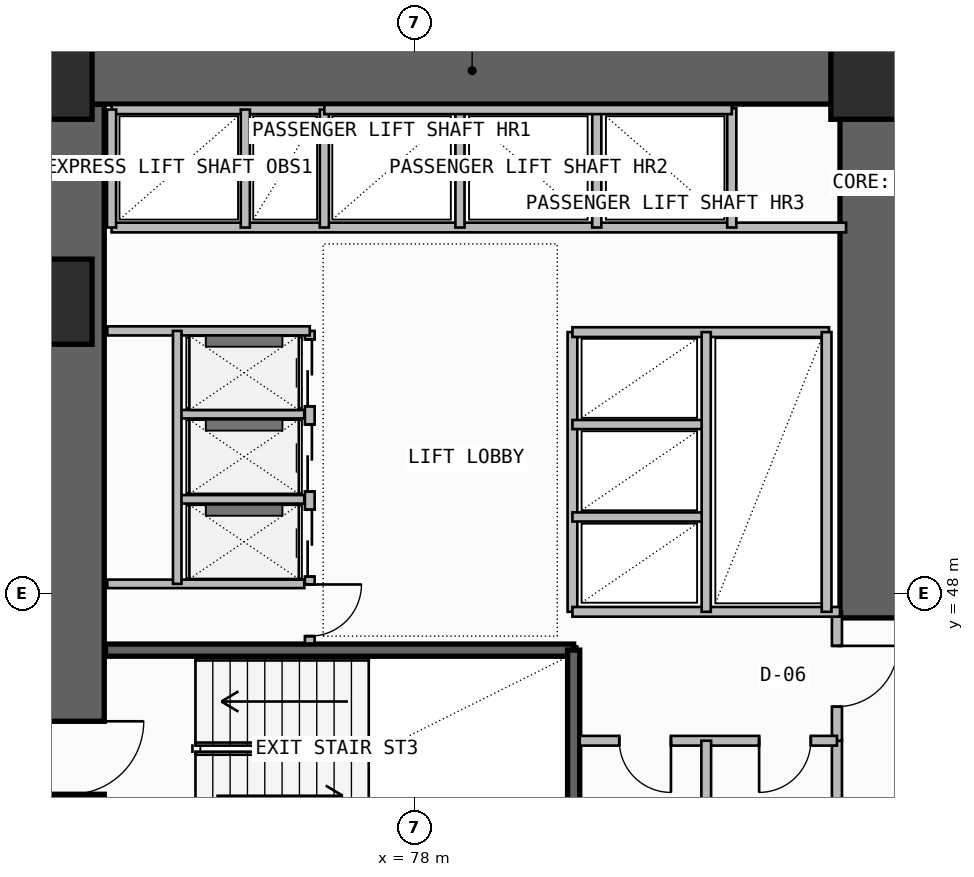
"""IFC4 building model, lengths in metres.
Left out: names, types, materials, properties, quantities, classifications, styles, units other than length and angle.
Written with IfcOpenShell. Run it as: python <this file> out.ifc"""

import sys

from ifc_helpers import new_model, si_unit, direction, frame, frame_2d, origin, origin_2d, place, context, subcontext, project, spatial, rectangle, extrude, element, fill, save


model = new_model("IFC4")
c1 = context("Model", 3, precision=1e-05, world=origin(), true_north=direction((0.0, 1.0)))
c2 = subcontext(c1, "Body", "Model", "MODEL_VIEW")
j1 = project(units=[si_unit("LENGTHUNIT", "METRE"), si_unit("PLANEANGLEUNIT", "RADIAN")], contexts=[c1])
p1 = place(None, origin())
s1 = spatial("IfcSite", under=j1, at=p1, CompositionType="ELEMENT")
p2 = place(p1, origin())
s2 = spatial("IfcBuilding", under=s1, at=p2, CompositionType="ELEMENT")
p3 = place(p2, frame((0.0, 0.0, 44.7)))
s3 = spatial("IfcBuildingStorey", under=s2, at=p3, CompositionType="ELEMENT", Elevation=44.7)
p4 = place(p3, frame((72.35, 43.35, -0.2), z_axis=(0.0, 0.0, 1.0), x_axis=(0.0, 1.0, 0.0)))
e1 = element("IfcWall", 1, at=p4, inside=s3, PredefinedType="SHEAR", context=c2, shape_type="SweptSolid", body=[
    extrude(rectangle(XDim=12.7, YDim=1.1, at=frame_2d((6.35, 0.0))), origin(), (0.0, 0.0, 1.0), 3.54),
])
p5 = place(p4, frame((1.35, 0.0, 0.2)))
e2 = element("IfcOpeningElement", 2, at=p5, cuts=e1, PredefinedType="OPENING", context=c2, shape_type="SweptSolid", body=[
    extrude(rectangle(XDim=1.2, YDim=2.2, at=frame_2d((0.6, 1.1))), frame((0.0, 0.56, 0.0), z_axis=(0.0, -1.0, 0.0), x_axis=(1.0, 0.0, 0.0)), (0.0, 0.0, 1.0), 1.12),
])
p6 = place(p3, frame((71.8, 56.6, -0.2), z_axis=(0.0, 0.0, 1.0), x_axis=(1.0, 0.0, 0.0)))
e3 = element("IfcWall", 3, at=p6, inside=s3, PredefinedType="SHEAR", context=c2, shape_type="SweptSolid", body=[
    extrude(rectangle(XDim=14.3, YDim=1.1, at=frame_2d((7.15, 0.0))), origin(), (0.0, 0.0, 1.0), 3.54),
])
p7 = place(p3, frame((85.55, 47.6, -0.2), z_axis=(0.0, 0.0, 1.0), x_axis=(0.0, 1.0, 0.0)))
e4 = element("IfcWall", 4, at=p7, inside=s3, PredefinedType="SHEAR", context=c2, shape_type="SweptSolid", body=[
    extrude(rectangle(XDim=8.45, YDim=1.1, at=frame_2d((4.225, 0.0))), origin(), (0.0, 0.0, 1.0), 3.54),
])
for number, where, z_axis, x_axis in (
    (5, (72.0, 52.8, 0.0), (0.0, 0.0, 1.0), (1.0, 0.0, 0.0)),
    (6, (72.0, 56.5, 0.0), (0.0, 0.0, 1.0), (1.0, 0.0, 0.0)),
    (7, (85.55, 56.5, 0.0), (0.0, 0.0, 1.0), (1.0, 0.0, 0.0)),
):
    element("IfcColumn", number, at=place(p3, frame(where, z_axis=z_axis, x_axis=x_axis)), inside=s3, PredefinedType="COLUMN", context=c2, shape_type="SweptSolid", body=[
        extrude(rectangle(XDim=1.4, YDim=1.4, at=origin_2d()), origin(), (0.0, 0.0, 1.0), 3.6),
    ])
p8 = place(p3, frame((72.92, 47.07, -0.2), z_axis=(0.0, 0.0, 1.0), x_axis=(1.0, 0.0, 0.0)))
e8 = element("IfcWall", 8, at=p8, inside=s3, PredefinedType="SOLIDWALL", context=c2, shape_type="SweptSolid", body=[
    extrude(rectangle(XDim=7.7, YDim=0.2, at=frame_2d((3.85, 0.0))), origin(), (0.0, 0.0, 1.0), 3.54),
])
p9 = place(p3, frame((80.62, 43.83, -0.2), z_axis=(0.0, 0.0, 1.0), x_axis=(0.0, 1.0, 0.0)))
e9 = element("IfcWall", 9, at=p9, inside=s3, PredefinedType="SOLIDWALL", context=c2, shape_type="SweptSolid", body=[
    extrude(rectangle(XDim=3.24, YDim=0.2, at=frame_2d((1.62, 0.0))), origin(), (0.0, 0.0, 1.0), 3.54),
])
p10 = place(p3, frame((84.95, 43.68, 0.0), z_axis=(0.0, 0.0, 1.0), x_axis=(0.0, 1.0, 0.0)))
e10 = element("IfcWall", 10, at=p10, inside=s3, PredefinedType="PLUMBINGWALL", context=c2, shape_type="SweptSolid", body=[
    extrude(rectangle(XDim=1.9, YDim=0.165, at=frame_2d((0.95, 0.0))), origin(), (0.0, 0.0, 1.0), 3.34),
])
p11 = place(p3, frame((84.95, 45.58, 0.0), z_axis=(0.0, 0.0, 1.0), x_axis=(0.0, 1.0, 0.0)))
e11 = element("IfcWall", 11, at=p11, inside=s3, PredefinedType="PARTITIONING", context=c2, shape_type="SweptSolid", body=[
    extrude(rectangle(XDim=2.12, YDim=0.165, at=frame_2d((1.06, 0.0))), origin(), (0.0, 0.0, 1.0), 3.34),
])
p12 = place(p11, frame((0.56, 0.0, 0.0)))
e12 = element("IfcOpeningElement", 12, at=p12, cuts=e11, PredefinedType="OPENING", context=c2, shape_type="SweptSolid", body=[
    extrude(rectangle(XDim=1.0, YDim=2.2, at=frame_2d((0.5, 1.1))), frame((0.0, 0.093, 0.0), z_axis=(0.0, -1.0, 0.0), x_axis=(1.0, 0.0, 0.0)), (0.0, 0.0, 1.0), 0.185),
])
p13 = place(p3, frame((80.72, 45.58, 0.0), z_axis=(0.0, 0.0, 1.0), x_axis=(1.0, 0.0, 0.0)))
e13 = element("IfcWall", 13, at=p13, inside=s3, PredefinedType="PLUMBINGWALL", context=c2, shape_type="SweptSolid", body=[
    extrude(rectangle(XDim=4.23, YDim=0.16, at=frame_2d((2.115, 0.0))), origin(), (0.0, 0.0, 1.0), 3.34),
])
p14 = place(p13, frame((0.65, 0.0, 0.0)))
e14 = element("IfcOpeningElement", 14, at=p14, cuts=e13, PredefinedType="OPENING", context=c2, shape_type="SweptSolid", body=[
    extrude(rectangle(XDim=0.85, YDim=2.05, at=frame_2d((0.425, 1.025))), frame((0.0, 0.09, 0.0), z_axis=(0.0, -1.0, 0.0), x_axis=(1.0, 0.0, 0.0)), (0.0, 0.0, 1.0), 0.18),
])
p15 = place(p13, frame((2.95, 0.0, 0.0)))
e15 = element("IfcOpeningElement", 15, at=p15, cuts=e13, PredefinedType="OPENING", context=c2, shape_type="SweptSolid", body=[
    extrude(rectangle(XDim=0.85, YDim=2.05, at=frame_2d((0.425, 1.025))), frame((0.0, 0.09, 0.0), z_axis=(0.0, -1.0, 0.0), x_axis=(1.0, 0.0, 0.0)), (0.0, 0.0, 1.0), 0.18),
])
p16 = place(p3, frame((82.8, 43.68, 0.0), z_axis=(0.0, 0.0, 1.0), x_axis=(0.0, 1.0, 0.0)))
e16 = element("IfcWall", 16, at=p16, inside=s3, PredefinedType="PLUMBINGWALL", context=c2, shape_type="SweptSolid", body=[
    extrude(rectangle(XDim=1.9, YDim=0.16, at=frame_2d((0.95, 0.0))), origin(), (0.0, 0.0, 1.0), 3.34),
])
p17 = place(p3, frame((76.28, 47.18, 0.0), z_axis=(0.0, 0.0, 1.0), x_axis=(0.0, 1.0, 0.0)))
e17 = element("IfcWall", 17, at=p17, inside=s3, PredefinedType="SOLIDWALL", context=c2, shape_type="SweptSolid", body=[
    extrude(rectangle(XDim=5.14, YDim=0.16, at=frame_2d((2.57, 0.0))), origin(), (0.0, 0.0, 1.0), 3.34),
])
p18 = place(p17, frame((1.1, 0.0, 0.0)))
e18 = element("IfcOpeningElement", 18, at=p18, cuts=e17, PredefinedType="OPENING", context=c2, shape_type="SweptSolid", body=[
    extrude(rectangle(XDim=1.1, YDim=2.25, at=frame_2d((0.55, 1.125))), frame((0.0, 0.09, 0.0), z_axis=(0.0, -1.0, 0.0), x_axis=(1.0, 0.0, 0.0)), (0.0, 0.0, 1.0), 0.18),
])
p19 = place(p17, frame((2.5, 0.0, 0.0)))
e19 = element("IfcOpeningElement", 19, at=p19, cuts=e17, PredefinedType="OPENING", context=c2, shape_type="SweptSolid", body=[
    extrude(rectangle(XDim=1.1, YDim=2.25, at=frame_2d((0.55, 1.125))), frame((0.0, 0.09, 0.0), z_axis=(0.0, -1.0, 0.0), x_axis=(1.0, 0.0, 0.0)), (0.0, 0.0, 1.0), 0.18),
])
p20 = place(p17, frame((3.9, 0.0, 0.0)))
e20 = element("IfcOpeningElement", 20, at=p20, cuts=e17, PredefinedType="OPENING", context=c2, shape_type="SweptSolid", body=[
    extrude(rectangle(XDim=1.1, YDim=2.25, at=frame_2d((0.55, 1.125))), frame((0.0, 0.09, 0.0), z_axis=(0.0, -1.0, 0.0), x_axis=(1.0, 0.0, 0.0)), (0.0, 0.0, 1.0), 0.18),
])
p21 = place(p17, frame((0.12, 0.0, 0.0)))
e21 = element("IfcOpeningElement", 21, at=p21, cuts=e17, PredefinedType="OPENING", context=c2, shape_type="SweptSolid", body=[
    extrude(rectangle(XDim=0.85, YDim=2.05, at=frame_2d((0.425, 1.025))), frame((0.0, 0.09, 0.0), z_axis=(0.0, -1.0, 0.0), x_axis=(1.0, 0.0, 0.0)), (0.0, 0.0, 1.0), 0.18),
])
p22 = place(p3, frame((72.95, 52.32, 0.0), z_axis=(0.0, 0.0, 1.0), x_axis=(1.0, 0.0, 0.0)))
e22 = element("IfcWall", 22, at=p22, inside=s3, PredefinedType="SOLIDWALL", context=c2, shape_type="SweptSolid", body=[
    extrude(rectangle(XDim=3.33, YDim=0.15, at=frame_2d((1.665, 0.0))), origin(), (0.0, 0.0, 1.0), 3.34),
])
p23 = place(p3, frame((72.95, 48.16, 0.0), z_axis=(0.0, 0.0, 1.0), x_axis=(1.0, 0.0, 0.0)))
e23 = element("IfcWall", 23, at=p23, inside=s3, PredefinedType="PLUMBINGWALL", context=c2, shape_type="SweptSolid", body=[
    extrude(rectangle(XDim=3.24, YDim=0.14, at=frame_2d((1.62, 0.0))), origin(), (0.0, 0.0, 1.0), 3.34),
])
for number, where, z_axis, x_axis in (
    (24, (74.15, 49.55, 0.0), (0.0, 0.0, 1.0), (1.0, 0.0, 0.0)),
    (25, (74.15, 50.95, 0.0), (0.0, 0.0, 1.0), (1.0, 0.0, 0.0)),
):
    element("IfcWall", number, at=place(p3, frame(where, z_axis=z_axis, x_axis=x_axis)), inside=s3, PredefinedType="PLUMBINGWALL", context=c2, shape_type="SweptSolid", body=[
        extrude(rectangle(XDim=2.04, YDim=0.14, at=frame_2d((1.02, 0.0))), origin(), (0.0, 0.0, 1.0), 3.34),
    ])
p24 = place(p3, frame((74.1, 48.16, 0.0), z_axis=(0.0, 0.0, 1.0), x_axis=(0.0, 1.0, 0.0)))
e26 = element("IfcWall", 26, at=p24, inside=s3, PredefinedType="PLUMBINGWALL", context=c2, shape_type="SweptSolid", body=[
    extrude(rectangle(XDim=4.16, YDim=0.14, at=frame_2d((2.08, 0.0))), origin(), (0.0, 0.0, 1.0), 3.34),
])
p25 = place(p3, frame((80.6, 47.7, 0.0), z_axis=(0.0, 0.0, 1.0), x_axis=(0.0, 1.0, 0.0)))
e27 = element("IfcWall", 27, at=p25, inside=s3, PredefinedType="SOLIDWALL", context=c2, shape_type="SweptSolid", body=[
    extrude(rectangle(XDim=4.6, YDim=0.16, at=frame_2d((2.3, 0.0))), origin(), (0.0, 0.0, 1.0), 3.34),
])
p26 = place(p3, frame((80.6, 47.7, 0.0), z_axis=(0.0, 0.0, 1.0), x_axis=(1.0, 0.0, 0.0)))
e28 = element("IfcWall", 28, at=p26, inside=s3, PredefinedType="SOLIDWALL", context=c2, shape_type="SweptSolid", body=[
    extrude(rectangle(XDim=4.4, YDim=0.16, at=frame_2d((2.2, 0.0))), origin(), (0.0, 0.0, 1.0), 3.34),
])
p27 = place(p3, frame((80.6, 52.3, 0.0), z_axis=(0.0, 0.0, 1.0), x_axis=(1.0, 0.0, 0.0)))
e29 = element("IfcWall", 29, at=p27, inside=s3, PredefinedType="SOLIDWALL", context=c2, shape_type="SweptSolid", body=[
    extrude(rectangle(XDim=4.22, YDim=0.16, at=frame_2d((2.11, 0.0))), origin(), (0.0, 0.0, 1.0), 3.34),
])
for number, where, z_axis, x_axis in (
    (30, (80.6, 49.26, 0.0), (0.0, 0.0, 1.0), (1.0, 0.0, 0.0)),
    (31, (80.6, 50.78, 0.0), (0.0, 0.0, 1.0), (1.0, 0.0, 0.0)),
):
    element("IfcWall", number, at=place(p3, frame(where, z_axis=z_axis, x_axis=x_axis)), inside=s3, PredefinedType="PLUMBINGWALL", context=c2, shape_type="SweptSolid", body=[
        extrude(rectangle(XDim=2.2, YDim=0.15, at=frame_2d((1.1, 0.0))), origin(), (0.0, 0.0, 1.0), 3.34),
    ])
p28 = place(p3, frame((82.8, 47.7, 0.0), z_axis=(0.0, 0.0, 1.0), x_axis=(0.0, 1.0, 0.0)))
e32 = element("IfcWall", 32, at=p28, inside=s3, PredefinedType="PLUMBINGWALL", context=c2, shape_type="SweptSolid", body=[
    extrude(rectangle(XDim=4.6, YDim=0.15, at=frame_2d((2.3, 0.0))), origin(), (0.0, 0.0, 1.0), 3.34),
])
p29 = place(p3, frame((84.78, 47.7, 0.0), z_axis=(0.0, 0.0, 1.0), x_axis=(0.0, 1.0, 0.0)))
e33 = element("IfcWall", 33, at=p29, inside=s3, PredefinedType="SOLIDWALL", context=c2, shape_type="SweptSolid", body=[
    extrude(rectangle(XDim=4.6, YDim=0.16, at=frame_2d((2.3, 0.0))), origin(), (0.0, 0.0, 1.0), 3.34),
])
p30 = place(p3, frame((73.02, 54.02, 0.0), z_axis=(0.0, 0.0, 1.0), x_axis=(1.0, 0.0, 0.0)))
e34 = element("IfcWall", 34, at=p30, inside=s3, PredefinedType="SOLIDWALL", context=c2, shape_type="SweptSolid", body=[
    extrude(rectangle(XDim=12.08, YDim=0.16, at=frame_2d((6.04, 0.0))), origin(), (0.0, 0.0, 1.0), 3.34),
])
p31 = place(p3, frame((73.02, 55.96, 0.0), z_axis=(0.0, 0.0, 1.0), x_axis=(1.0, 0.0, 0.0)))
e35 = element("IfcWall", 35, at=p31, inside=s3, PredefinedType="SOLIDWALL", context=c2, shape_type="SweptSolid", body=[
    extrude(rectangle(XDim=3.5, YDim=0.15, at=frame_2d((1.75, 0.0))), origin(), (0.0, 0.0, 1.0), 3.34),
])
p32 = place(p3, frame((73.02, 54.02, 0.0), z_axis=(0.0, 0.0, 1.0), x_axis=(0.0, 1.0, 0.0)))
e36 = element("IfcWall", 36, at=p32, inside=s3, PredefinedType="PLUMBINGWALL", context=c2, shape_type="SweptSolid", body=[
    extrude(rectangle(XDim=1.94, YDim=0.15, at=frame_2d((0.97, 0.0))), origin(), (0.0, 0.0, 1.0), 3.34),
])
p33 = place(p3, frame((76.52, 54.02, 0.0), z_axis=(0.0, 0.0, 1.0), x_axis=(0.0, 1.0, 0.0)))
e37 = element("IfcWall", 37, at=p33, inside=s3, PredefinedType="SOLIDWALL", context=c2, shape_type="SweptSolid", body=[
    extrude(rectangle(XDim=1.94, YDim=0.15, at=frame_2d((0.97, 0.0))), origin(), (0.0, 0.0, 1.0), 3.34),
])
p34 = place(p3, frame((75.22, 54.02, 0.0), z_axis=(0.0, 0.0, 1.0), x_axis=(0.0, 1.0, 0.0)))
e38 = element("IfcWall", 38, at=p34, inside=s3, PredefinedType="PLUMBINGWALL", context=c2, shape_type="SweptSolid", body=[
    extrude(rectangle(XDim=1.94, YDim=0.15, at=frame_2d((0.97, 0.0))), origin(), (0.0, 0.0, 1.0), 3.34),
])
for number, where, z_axis, x_axis in (
    (39, (78.75, 54.02, 0.0), (0.0, 0.0, 1.0), (0.0, 1.0, 0.0)),
    (40, (81.0, 54.02, 0.0), (0.0, 0.0, 1.0), (0.0, 1.0, 0.0)),
):
    element("IfcWall", number, at=place(p3, frame(where, z_axis=z_axis, x_axis=x_axis)), inside=s3, PredefinedType="PLUMBINGWALL", context=c2, shape_type="SweptSolid", body=[
        extrude(rectangle(XDim=1.96, YDim=0.15, at=frame_2d((0.98, 0.0))), origin(), (0.0, 0.0, 1.0), 3.34),
    ])
p35 = place(p3, frame((83.22, 54.02, 0.0), z_axis=(0.0, 0.0, 1.0), x_axis=(0.0, 1.0, 0.0)))
e41 = element("IfcWall", 41, at=p35, inside=s3, PredefinedType="SOLIDWALL", context=c2, shape_type="SweptSolid", body=[
    extrude(rectangle(XDim=1.96, YDim=0.15, at=frame_2d((0.98, 0.0))), origin(), (0.0, 0.0, 1.0), 3.34),
])
p36 = place(p3, frame((76.52, 55.96, 0.0), z_axis=(0.0, 0.0, 1.0), x_axis=(1.0, 0.0, 0.0)))
e42 = element("IfcWall", 42, at=p36, inside=s3, PredefinedType="SOLIDWALL", context=c2, shape_type="SweptSolid", body=[
    extrude(rectangle(XDim=6.7, YDim=0.15, at=frame_2d((3.35, 0.0))), origin(), (0.0, 0.0, 1.0), 3.34),
])
p37 = place(p5, frame((1.2, 0.0, 0.0), z_axis=(0.0, 0.0, 1.0), x_axis=(-1.0, 0.0, 0.0)))
e43 = element("IfcDoor", 43, at=p37, inside=s3, OperationType="SINGLE_SWING_LEFT", PredefinedType="USERDEFINED", context=c2, shape_type="SweptSolid", body=[
    extrude(rectangle(XDim=1.2, YDim=2.2, at=frame_2d((0.6, 1.1))), frame((0.0, 0.025, 0.0), z_axis=(0.0, -1.0, 0.0), x_axis=(1.0, 0.0, 0.0)), (0.0, 0.0, 1.0), 0.05),
])
fill(e2, e43)
p38 = place(p12, frame((1.0, 0.0, 0.0), z_axis=(0.0, 0.0, 1.0), x_axis=(-1.0, 0.0, 0.0)))
e44 = element("IfcDoor", 44, at=p38, inside=s3, OperationType="SINGLE_SWING_LEFT", PredefinedType="DOOR", context=c2, shape_type="SweptSolid", body=[
    extrude(rectangle(XDim=1.0, YDim=2.2, at=frame_2d((0.5, 1.1))), frame((0.0, 0.025, 0.0), z_axis=(0.0, -1.0, 0.0), x_axis=(1.0, 0.0, 0.0)), (0.0, 0.0, 1.0), 0.05),
])
fill(e12, e44)
p39 = place(p14, frame((0.85, 0.0, 0.0), z_axis=(0.0, 0.0, 1.0), x_axis=(-1.0, 0.0, 0.0)))
e45 = element("IfcDoor", 45, at=p39, inside=s3, OperationType="SINGLE_SWING_LEFT", PredefinedType="DOOR", context=c2, shape_type="SweptSolid", body=[
    extrude(rectangle(XDim=0.85, YDim=2.05, at=frame_2d((0.425, 1.025))), frame((0.0, 0.025, 0.0), z_axis=(0.0, -1.0, 0.0), x_axis=(1.0, 0.0, 0.0)), (0.0, 0.0, 1.0), 0.05),
])
fill(e14, e45)
p40 = place(p15, frame((0.85, 0.0, 0.0), z_axis=(0.0, 0.0, 1.0), x_axis=(-1.0, 0.0, 0.0)))
e46 = element("IfcDoor", 46, at=p40, inside=s3, OperationType="SINGLE_SWING_RIGHT", PredefinedType="DOOR", context=c2, shape_type="SweptSolid", body=[
    extrude(rectangle(XDim=0.85, YDim=2.05, at=frame_2d((0.425, 1.025))), frame((0.0, 0.025, 0.0), z_axis=(0.0, -1.0, 0.0), x_axis=(1.0, 0.0, 0.0)), (0.0, 0.0, 1.0), 0.05),
])
fill(e15, e46)
p41 = place(p18, origin())
e47 = element("IfcDoor", 47, at=p41, inside=s3, OperationType="DOUBLE_DOOR_SLIDING", PredefinedType="DOOR", context=c2, shape_type="SweptSolid", body=[
    extrude(rectangle(XDim=1.1, YDim=2.25, at=frame_2d((0.55, 1.125))), frame((0.0, 0.025, 0.0), z_axis=(0.0, -1.0, 0.0), x_axis=(1.0, 0.0, 0.0)), (0.0, 0.0, 1.0), 0.05),
])
fill(e18, e47)
p42 = place(p19, origin())
e48 = element("IfcDoor", 48, at=p42, inside=s3, OperationType="DOUBLE_DOOR_SLIDING", PredefinedType="DOOR", context=c2, shape_type="SweptSolid", body=[
    extrude(rectangle(XDim=1.1, YDim=2.25, at=frame_2d((0.55, 1.125))), frame((0.0, 0.025, 0.0), z_axis=(0.0, -1.0, 0.0), x_axis=(1.0, 0.0, 0.0)), (0.0, 0.0, 1.0), 0.05),
])
fill(e19, e48)
p43 = place(p20, origin())
e49 = element("IfcDoor", 49, at=p43, inside=s3, OperationType="DOUBLE_DOOR_SLIDING", PredefinedType="DOOR", context=c2, shape_type="SweptSolid", body=[
    extrude(rectangle(XDim=1.1, YDim=2.25, at=frame_2d((0.55, 1.125))), frame((0.0, 0.025, 0.0), z_axis=(0.0, -1.0, 0.0), x_axis=(1.0, 0.0, 0.0)), (0.0, 0.0, 1.0), 0.05),
])
fill(e20, e49)
p44 = place(p21, frame((0.85, 0.0, 0.0), z_axis=(0.0, 0.0, 1.0), x_axis=(-1.0, 0.0, 0.0)))
e50 = element("IfcDoor", 50, at=p44, inside=s3, OperationType="SINGLE_SWING_LEFT", PredefinedType="DOOR", context=c2, shape_type="SweptSolid", body=[
    extrude(rectangle(XDim=0.85, YDim=2.05, at=frame_2d((0.425, 1.025))), frame((0.0, 0.025, 0.0), z_axis=(0.0, -1.0, 0.0), x_axis=(1.0, 0.0, 0.0)), (0.0, 0.0, 1.0), 0.05),
])
fill(e21, e50)
save(model, sys.argv[1])
